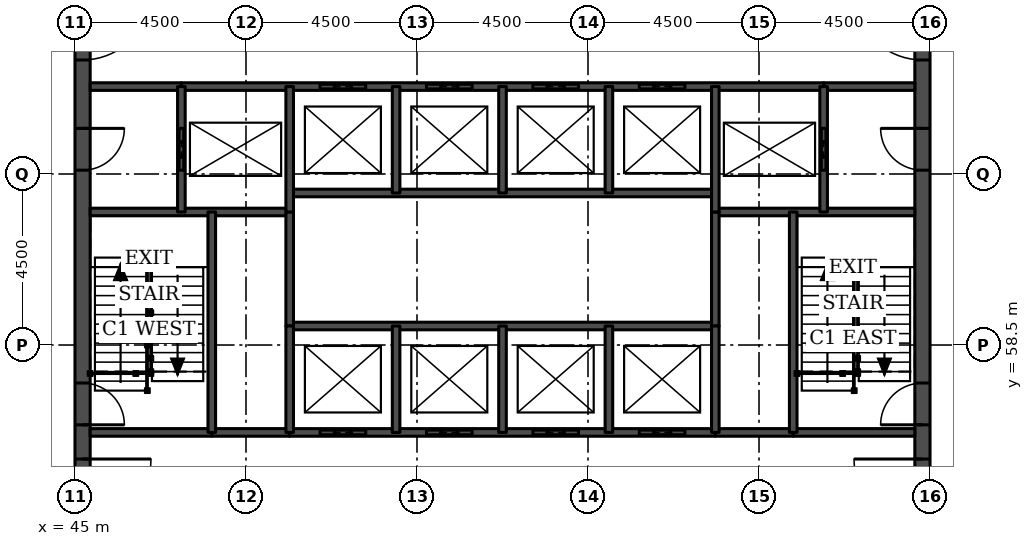
"""IFC4 building model, lengths in metres.
Left out: names, types, materials, properties, quantities, classifications, styles, units other than length and angle.
Written with IfcOpenShell. Run it as: python <this file> out.ifc"""

import sys

from ifc_helpers import new_model, si_unit, direction, frame, frame_2d, origin, place, context, subcontext, project, spatial, rectangle, extrude, element, fill, save


model = new_model("IFC4")
c1 = context("Model", 3, precision=1e-05, world=origin(), true_north=direction((0.0, 1.0)))
c2 = subcontext(c1, "Body", "Model", "MODEL_VIEW")
j1 = project(units=[si_unit("LENGTHUNIT", "METRE"), si_unit("PLANEANGLEUNIT", "RADIAN")], contexts=[c1])
p1 = place(None, origin())
s1 = spatial("IfcSite", under=j1, at=p1, CompositionType="ELEMENT")
p2 = place(p1, origin())
s2 = spatial("IfcBuilding", under=s1, at=p2, CompositionType="ELEMENT")
p3 = place(p2, frame((0.0, 0.0, 237.8)))
s3 = spatial("IfcBuildingStorey", under=s2, at=p3, CompositionType="ELEMENT", Elevation=237.8)
p4 = place(p3, frame((45.2, 49.5, 0.0), z_axis=(0.0, 0.0, 1.0), x_axis=(0.0, 1.0, 0.0)))
e1 = element("IfcWall", 1, at=p4, inside=s3, PredefinedType="SHEAR", context=c2, shape_type="SweptSolid", body=[
    extrude(rectangle(XDim=22.5, YDim=0.4, at=frame_2d((11.25, 0.0))), origin(), (0.0, 0.0, 1.0), 3.7),
])
p5 = place(p4, frame((4.2, 0.0, 0.0)))
e2 = element("IfcOpeningElement", 2, at=p5, cuts=e1, PredefinedType="OPENING", context=c2, shape_type="SweptSolid", body=[
    extrude(rectangle(XDim=1.8, YDim=2.1, at=frame_2d((0.9, 1.05))), frame((0.0, 0.21, 0.0), z_axis=(0.0, -1.0, 0.0), x_axis=(1.0, 0.0, 0.0)), (0.0, 0.0, 1.0), 0.42),
])
p6 = place(p4, frame((6.9, 0.0, 0.0)))
e3 = element("IfcOpeningElement", 3, at=p6, cuts=e1, PredefinedType="OPENING", context=c2, shape_type="SweptSolid", body=[
    extrude(rectangle(XDim=1.1, YDim=2.1, at=frame_2d((0.55, 1.05))), frame((0.0, 0.21, 0.0), z_axis=(0.0, -1.0, 0.0), x_axis=(1.0, 0.0, 0.0)), (0.0, 0.0, 1.0), 0.42),
])
p7 = place(p4, frame((13.6, 0.0, 0.0)))
e4 = element("IfcOpeningElement", 4, at=p7, cuts=e1, PredefinedType="OPENING", context=c2, shape_type="SweptSolid", body=[
    extrude(rectangle(XDim=1.1, YDim=2.1, at=frame_2d((0.55, 1.05))), frame((0.0, 0.21, 0.0), z_axis=(0.0, -1.0, 0.0), x_axis=(1.0, 0.0, 0.0)), (0.0, 0.0, 1.0), 0.42),
])
p8 = place(p4, frame((16.5, 0.0, 0.0)))
e5 = element("IfcOpeningElement", 5, at=p8, cuts=e1, PredefinedType="OPENING", context=c2, shape_type="SweptSolid", body=[
    extrude(rectangle(XDim=1.8, YDim=2.1, at=frame_2d((0.9, 1.05))), frame((0.0, 0.21, 0.0), z_axis=(0.0, -1.0, 0.0), x_axis=(1.0, 0.0, 0.0)), (0.0, 0.0, 1.0), 0.42),
])
p9 = place(p3, frame((67.3, 49.5, 0.0), z_axis=(0.0, 0.0, 1.0), x_axis=(0.0, 1.0, 0.0)))
e6 = element("IfcWall", 6, at=p9, inside=s3, PredefinedType="SHEAR", context=c2, shape_type="SweptSolid", body=[
    extrude(rectangle(XDim=22.5, YDim=0.4, at=frame_2d((11.25, 0.0))), origin(), (0.0, 0.0, 1.0), 3.7),
])
p10 = place(p9, frame((4.2, 0.0, 0.0)))
e7 = element("IfcOpeningElement", 7, at=p10, cuts=e6, PredefinedType="OPENING", context=c2, shape_type="SweptSolid", body=[
    extrude(rectangle(XDim=1.8, YDim=2.1, at=frame_2d((0.9, 1.05))), frame((0.0, 0.21, 0.0), z_axis=(0.0, -1.0, 0.0), x_axis=(1.0, 0.0, 0.0)), (0.0, 0.0, 1.0), 0.42),
])
p11 = place(p9, frame((6.9, 0.0, 0.0)))
e8 = element("IfcOpeningElement", 8, at=p11, cuts=e6, PredefinedType="OPENING", context=c2, shape_type="SweptSolid", body=[
    extrude(rectangle(XDim=1.1, YDim=2.1, at=frame_2d((0.55, 1.05))), frame((0.0, 0.21, 0.0), z_axis=(0.0, -1.0, 0.0), x_axis=(1.0, 0.0, 0.0)), (0.0, 0.0, 1.0), 0.42),
])
p12 = place(p9, frame((13.6, 0.0, 0.0)))
e9 = element("IfcOpeningElement", 9, at=p12, cuts=e6, PredefinedType="OPENING", context=c2, shape_type="SweptSolid", body=[
    extrude(rectangle(XDim=1.1, YDim=2.1, at=frame_2d((0.55, 1.05))), frame((0.0, 0.21, 0.0), z_axis=(0.0, -1.0, 0.0), x_axis=(1.0, 0.0, 0.0)), (0.0, 0.0, 1.0), 0.42),
])
p13 = place(p9, frame((16.5, 0.0, 0.0)))
e10 = element("IfcOpeningElement", 10, at=p13, cuts=e6, PredefinedType="OPENING", context=c2, shape_type="SweptSolid", body=[
    extrude(rectangle(XDim=1.8, YDim=2.1, at=frame_2d((0.9, 1.05))), frame((0.0, 0.21, 0.0), z_axis=(0.0, -1.0, 0.0), x_axis=(1.0, 0.0, 0.0)), (0.0, 0.0, 1.0), 0.42),
])
for number, where, z_axis, x_axis in (
    (11, (48.6, 56.2, 0.0), (0.0, 0.0, 1.0), (1.0, 0.0, 0.0)),
    (12, (61.85, 56.2, 0.0), (0.0, 0.0, 1.0), (1.0, 0.0, 0.0)),
):
    element("IfcWall", number, at=place(p3, frame(where, z_axis=z_axis, x_axis=x_axis)), inside=s3, PredefinedType="SOLIDWALL", context=c2, shape_type="SweptSolid", body=[
        extrude(rectangle(XDim=2.05, YDim=0.2, at=frame_2d((1.025, 0.0))), origin(), (0.0, 0.0, 1.0), 3.55),
    ])
p14 = place(p3, frame((45.4, 56.2, 0.0), z_axis=(0.0, 0.0, 1.0), x_axis=(1.0, 0.0, 0.0)))
e13 = element("IfcWall", 13, at=p14, inside=s3, PredefinedType="SOLIDWALL", context=c2, shape_type="SweptSolid", body=[
    extrude(rectangle(XDim=3.2, YDim=0.2, at=frame_2d((1.6, 0.0))), origin(), (0.0, 0.0, 1.0), 3.55),
])
p15 = place(p3, frame((50.65, 56.2, 0.0), z_axis=(0.0, 0.0, 1.0), x_axis=(1.0, 0.0, 0.0)))
e14 = element("IfcWall", 14, at=p15, inside=s3, PredefinedType="SOLIDWALL", context=c2, shape_type="SweptSolid", body=[
    extrude(rectangle(XDim=11.2, YDim=0.2, at=frame_2d((5.6, 0.0))), origin(), (0.0, 0.0, 1.0), 3.55),
])
p16 = place(p15, frame((0.8, 0.0, 0.0)))
e15 = element("IfcOpeningElement", 15, at=p16, cuts=e14, PredefinedType="OPENING", context=c2, shape_type="SweptSolid", body=[
    extrude(rectangle(XDim=1.2, YDim=2.1, at=frame_2d((0.6, 1.05))), frame((0.0, 0.11, 0.0), z_axis=(0.0, -1.0, 0.0), x_axis=(1.0, 0.0, 0.0)), (0.0, 0.0, 1.0), 0.22),
])
p17 = place(p15, frame((3.6, 0.0, 0.0)))
e16 = element("IfcOpeningElement", 16, at=p17, cuts=e14, PredefinedType="OPENING", context=c2, shape_type="SweptSolid", body=[
    extrude(rectangle(XDim=1.2, YDim=2.1, at=frame_2d((0.6, 1.05))), frame((0.0, 0.11, 0.0), z_axis=(0.0, -1.0, 0.0), x_axis=(1.0, 0.0, 0.0)), (0.0, 0.0, 1.0), 0.22),
])
p18 = place(p15, frame((6.4, 0.0, 0.0)))
e17 = element("IfcOpeningElement", 17, at=p18, cuts=e14, PredefinedType="OPENING", context=c2, shape_type="SweptSolid", body=[
    extrude(rectangle(XDim=1.2, YDim=2.1, at=frame_2d((0.6, 1.05))), frame((0.0, 0.11, 0.0), z_axis=(0.0, -1.0, 0.0), x_axis=(1.0, 0.0, 0.0)), (0.0, 0.0, 1.0), 0.22),
])
p19 = place(p15, frame((9.2, 0.0, 0.0)))
e18 = element("IfcOpeningElement", 18, at=p19, cuts=e14, PredefinedType="OPENING", context=c2, shape_type="SweptSolid", body=[
    extrude(rectangle(XDim=1.2, YDim=2.1, at=frame_2d((0.6, 1.05))), frame((0.0, 0.11, 0.0), z_axis=(0.0, -1.0, 0.0), x_axis=(1.0, 0.0, 0.0)), (0.0, 0.0, 1.0), 0.22),
])
p20 = place(p3, frame((63.9, 56.2, 0.0), z_axis=(0.0, 0.0, 1.0), x_axis=(1.0, 0.0, 0.0)))
e19 = element("IfcWall", 19, at=p20, inside=s3, PredefinedType="SOLIDWALL", context=c2, shape_type="SweptSolid", body=[
    extrude(rectangle(XDim=3.2, YDim=0.2, at=frame_2d((1.6, 0.0))), origin(), (0.0, 0.0, 1.0), 3.55),
])
p21 = place(p3, frame((50.65, 59.0, 0.0), z_axis=(0.0, 0.0, 1.0), x_axis=(1.0, 0.0, 0.0)))
e20 = element("IfcWall", 20, at=p21, inside=s3, PredefinedType="SOLIDWALL", context=c2, shape_type="SweptSolid", body=[
    extrude(rectangle(XDim=11.2, YDim=0.2, at=frame_2d((5.6, 0.0))), origin(), (0.0, 0.0, 1.0), 3.7),
])
for number, where, z_axis, x_axis in (
    (21, (45.4, 62.0, 0.0), (0.0, 0.0, 1.0), (1.0, 0.0, 0.0)),
    (22, (61.85, 62.0, 0.0), (0.0, 0.0, 1.0), (1.0, 0.0, 0.0)),
):
    element("IfcWall", number, at=place(p3, frame(where, z_axis=z_axis, x_axis=x_axis)), inside=s3, PredefinedType="SOLIDWALL", context=c2, shape_type="SweptSolid", body=[
        extrude(rectangle(XDim=5.25, YDim=0.2, at=frame_2d((2.625, 0.0))), origin(), (0.0, 0.0, 1.0), 3.55),
    ])
p22 = place(p3, frame((50.65, 62.5, 0.0), z_axis=(0.0, 0.0, 1.0), x_axis=(1.0, 0.0, 0.0)))
e23 = element("IfcWall", 23, at=p22, inside=s3, PredefinedType="SOLIDWALL", context=c2, shape_type="SweptSolid", body=[
    extrude(rectangle(XDim=11.2, YDim=0.2, at=frame_2d((5.6, 0.0))), origin(), (0.0, 0.0, 1.0), 3.7),
])
for number, where, z_axis, x_axis in (
    (24, (45.4, 65.3, 0.0), (0.0, 0.0, 1.0), (1.0, 0.0, 0.0)),
    (25, (64.7, 65.3, 0.0), (0.0, 0.0, 1.0), (1.0, 0.0, 0.0)),
):
    element("IfcWall", number, at=place(p3, frame(where, z_axis=z_axis, x_axis=x_axis)), inside=s3, PredefinedType="SOLIDWALL", context=c2, shape_type="SweptSolid", body=[
        extrude(rectangle(XDim=2.4, YDim=0.2, at=frame_2d((1.2, 0.0))), origin(), (0.0, 0.0, 1.0), 3.55),
    ])
p23 = place(p3, frame((47.8, 65.3, 0.0), z_axis=(0.0, 0.0, 1.0), x_axis=(1.0, 0.0, 0.0)))
e26 = element("IfcWall", 26, at=p23, inside=s3, PredefinedType="SOLIDWALL", context=c2, shape_type="SweptSolid", body=[
    extrude(rectangle(XDim=16.9, YDim=0.2, at=frame_2d((8.45, 0.0))), origin(), (0.0, 0.0, 1.0), 3.55),
])
p24 = place(p23, frame((3.65, 0.0, 0.0)))
e27 = element("IfcOpeningElement", 27, at=p24, cuts=e26, PredefinedType="OPENING", context=c2, shape_type="SweptSolid", body=[
    extrude(rectangle(XDim=1.2, YDim=2.1, at=frame_2d((0.6, 1.05))), frame((0.0, 0.11, 0.0), z_axis=(0.0, -1.0, 0.0), x_axis=(1.0, 0.0, 0.0)), (0.0, 0.0, 1.0), 0.22),
])
p25 = place(p23, frame((6.45, 0.0, 0.0)))
e28 = element("IfcOpeningElement", 28, at=p25, cuts=e26, PredefinedType="OPENING", context=c2, shape_type="SweptSolid", body=[
    extrude(rectangle(XDim=1.2, YDim=2.1, at=frame_2d((0.6, 1.05))), frame((0.0, 0.11, 0.0), z_axis=(0.0, -1.0, 0.0), x_axis=(1.0, 0.0, 0.0)), (0.0, 0.0, 1.0), 0.22),
])
p26 = place(p23, frame((9.25, 0.0, 0.0)))
e29 = element("IfcOpeningElement", 29, at=p26, cuts=e26, PredefinedType="OPENING", context=c2, shape_type="SweptSolid", body=[
    extrude(rectangle(XDim=1.2, YDim=2.1, at=frame_2d((0.6, 1.05))), frame((0.0, 0.11, 0.0), z_axis=(0.0, -1.0, 0.0), x_axis=(1.0, 0.0, 0.0)), (0.0, 0.0, 1.0), 0.22),
])
p27 = place(p23, frame((12.05, 0.0, 0.0)))
e30 = element("IfcOpeningElement", 30, at=p27, cuts=e26, PredefinedType="OPENING", context=c2, shape_type="SweptSolid", body=[
    extrude(rectangle(XDim=1.2, YDim=2.1, at=frame_2d((0.6, 1.05))), frame((0.0, 0.11, 0.0), z_axis=(0.0, -1.0, 0.0), x_axis=(1.0, 0.0, 0.0)), (0.0, 0.0, 1.0), 0.22),
])
p28 = place(p3, frame((47.8, 62.0, 0.0), z_axis=(0.0, 0.0, 1.0), x_axis=(0.0, 1.0, 0.0)))
e31 = element("IfcWall", 31, at=p28, inside=s3, PredefinedType="SOLIDWALL", context=c2, shape_type="SweptSolid", body=[
    extrude(rectangle(XDim=3.3, YDim=0.2, at=frame_2d((1.65, 0.0))), origin(), (0.0, 0.0, 1.0), 3.55),
])
p29 = place(p28, frame((1.1, 0.0, 0.0)))
e32 = element("IfcOpeningElement", 32, at=p29, cuts=e31, PredefinedType="OPENING", context=c2, shape_type="SweptSolid", body=[
    extrude(rectangle(XDim=1.1, YDim=2.1, at=frame_2d((0.55, 1.05))), frame((0.0, 0.11, 0.0), z_axis=(0.0, -1.0, 0.0), x_axis=(1.0, 0.0, 0.0)), (0.0, 0.0, 1.0), 0.22),
])
p30 = place(p3, frame((48.6, 56.2, 0.0), z_axis=(0.0, 0.0, 1.0), x_axis=(0.0, 1.0, 0.0)))
e33 = element("IfcWall", 33, at=p30, inside=s3, PredefinedType="SOLIDWALL", context=c2, shape_type="SweptSolid", body=[
    extrude(rectangle(XDim=5.8, YDim=0.2, at=frame_2d((2.9, 0.0))), origin(), (0.0, 0.0, 1.0), 3.55),
])
p31 = place(p3, frame((50.65, 59.0, 0.0), z_axis=(0.0, 0.0, 1.0), x_axis=(0.0, 1.0, 0.0)))
e34 = element("IfcWall", 34, at=p31, inside=s3, PredefinedType="SOLIDWALL", context=c2, shape_type="SweptSolid", body=[
    extrude(rectangle(XDim=3.0, YDim=0.2, at=frame_2d((1.5, 0.0))), origin(), (0.0, 0.0, 1.0), 3.7),
])
p32 = place(p3, frame((50.65, 56.2, 0.0), z_axis=(0.0, 0.0, 1.0), x_axis=(0.0, 1.0, 0.0)))
e35 = element("IfcWall", 35, at=p32, inside=s3, PredefinedType="SOLIDWALL", context=c2, shape_type="SweptSolid", body=[
    extrude(rectangle(XDim=2.8, YDim=0.2, at=frame_2d((1.4, 0.0))), origin(), (0.0, 0.0, 1.0), 3.55),
])
p33 = place(p3, frame((50.65, 62.0, 0.0), z_axis=(0.0, 0.0, 1.0), x_axis=(0.0, 1.0, 0.0)))
e36 = element("IfcWall", 36, at=p33, inside=s3, PredefinedType="SOLIDWALL", context=c2, shape_type="SweptSolid", body=[
    extrude(rectangle(XDim=3.3, YDim=0.2, at=frame_2d((1.65, 0.0))), origin(), (0.0, 0.0, 1.0), 3.55),
])
for number, where, z_axis, x_axis in (
    (37, (53.45, 56.2, 0.0), (0.0, 0.0, 1.0), (0.0, 1.0, 0.0)),
    (38, (53.45, 62.5, 0.0), (0.0, 0.0, 1.0), (0.0, 1.0, 0.0)),
    (39, (56.25, 56.2, 0.0), (0.0, 0.0, 1.0), (0.0, 1.0, 0.0)),
    (40, (56.25, 62.5, 0.0), (0.0, 0.0, 1.0), (0.0, 1.0, 0.0)),
    (41, (59.05, 56.2, 0.0), (0.0, 0.0, 1.0), (0.0, 1.0, 0.0)),
    (42, (59.05, 62.5, 0.0), (0.0, 0.0, 1.0), (0.0, 1.0, 0.0)),
):
    element("IfcWall", number, at=place(p3, frame(where, z_axis=z_axis, x_axis=x_axis)), inside=s3, PredefinedType="SOLIDWALL", context=c2, shape_type="SweptSolid", body=[
        extrude(rectangle(XDim=2.8, YDim=0.2, at=frame_2d((1.4, 0.0))), origin(), (0.0, 0.0, 1.0), 3.55),
    ])
p34 = place(p3, frame((61.85, 59.0, 0.0), z_axis=(0.0, 0.0, 1.0), x_axis=(0.0, 1.0, 0.0)))
e43 = element("IfcWall", 43, at=p34, inside=s3, PredefinedType="SOLIDWALL", context=c2, shape_type="SweptSolid", body=[
    extrude(rectangle(XDim=3.0, YDim=0.2, at=frame_2d((1.5, 0.0))), origin(), (0.0, 0.0, 1.0), 3.7),
])
p35 = place(p3, frame((61.85, 56.2, 0.0), z_axis=(0.0, 0.0, 1.0), x_axis=(0.0, 1.0, 0.0)))
e44 = element("IfcWall", 44, at=p35, inside=s3, PredefinedType="SOLIDWALL", context=c2, shape_type="SweptSolid", body=[
    extrude(rectangle(XDim=2.8, YDim=0.2, at=frame_2d((1.4, 0.0))), origin(), (0.0, 0.0, 1.0), 3.55),
])
p36 = place(p3, frame((61.85, 62.0, 0.0), z_axis=(0.0, 0.0, 1.0), x_axis=(0.0, 1.0, 0.0)))
e45 = element("IfcWall", 45, at=p36, inside=s3, PredefinedType="SOLIDWALL", context=c2, shape_type="SweptSolid", body=[
    extrude(rectangle(XDim=3.3, YDim=0.2, at=frame_2d((1.65, 0.0))), origin(), (0.0, 0.0, 1.0), 3.55),
])
p37 = place(p3, frame((63.9, 56.2, 0.0), z_axis=(0.0, 0.0, 1.0), x_axis=(0.0, 1.0, 0.0)))
e46 = element("IfcWall", 46, at=p37, inside=s3, PredefinedType="SOLIDWALL", context=c2, shape_type="SweptSolid", body=[
    extrude(rectangle(XDim=5.8, YDim=0.2, at=frame_2d((2.9, 0.0))), origin(), (0.0, 0.0, 1.0), 3.55),
])
p38 = place(p3, frame((64.7, 62.0, 0.0), z_axis=(0.0, 0.0, 1.0), x_axis=(0.0, 1.0, 0.0)))
e47 = element("IfcWall", 47, at=p38, inside=s3, PredefinedType="SOLIDWALL", context=c2, shape_type="SweptSolid", body=[
    extrude(rectangle(XDim=3.3, YDim=0.2, at=frame_2d((1.65, 0.0))), origin(), (0.0, 0.0, 1.0), 3.55),
])
p39 = place(p38, frame((1.1, 0.0, 0.0)))
e48 = element("IfcOpeningElement", 48, at=p39, cuts=e47, PredefinedType="OPENING", context=c2, shape_type="SweptSolid", body=[
    extrude(rectangle(XDim=1.1, YDim=2.1, at=frame_2d((0.55, 1.05))), frame((0.0, 0.11, 0.0), z_axis=(0.0, -1.0, 0.0), x_axis=(1.0, 0.0, 0.0)), (0.0, 0.0, 1.0), 0.22),
])
p40 = place(p16, origin())
e49 = element("IfcDoor", 49, at=p40, inside=s3, OperationType="DOUBLE_DOOR_SLIDING", PredefinedType="DOOR", context=c2, shape_type="SweptSolid", body=[
    extrude(rectangle(XDim=1.2, YDim=2.1, at=frame_2d((0.6, 1.05))), frame((0.0, 0.025, 0.0), z_axis=(0.0, -1.0, 0.0), x_axis=(1.0, 0.0, 0.0)), (0.0, 0.0, 1.0), 0.05),
])
fill(e15, e49)
p41 = place(p17, origin())
e50 = element("IfcDoor", 50, at=p41, inside=s3, OperationType="DOUBLE_DOOR_SLIDING", PredefinedType="DOOR", context=c2, shape_type="SweptSolid", body=[
    extrude(rectangle(XDim=1.2, YDim=2.1, at=frame_2d((0.6, 1.05))), frame((0.0, 0.025, 0.0), z_axis=(0.0, -1.0, 0.0), x_axis=(1.0, 0.0, 0.0)), (0.0, 0.0, 1.0), 0.05),
])
fill(e16, e50)
p42 = place(p18, origin())
e51 = element("IfcDoor", 51, at=p42, inside=s3, OperationType="DOUBLE_DOOR_SLIDING", PredefinedType="DOOR", context=c2, shape_type="SweptSolid", body=[
    extrude(rectangle(XDim=1.2, YDim=2.1, at=frame_2d((0.6, 1.05))), frame((0.0, 0.025, 0.0), z_axis=(0.0, -1.0, 0.0), x_axis=(1.0, 0.0, 0.0)), (0.0, 0.0, 1.0), 0.05),
])
fill(e17, e51)
p43 = place(p19, origin())
e52 = element("IfcDoor", 52, at=p43, inside=s3, OperationType="DOUBLE_DOOR_SLIDING", PredefinedType="DOOR", context=c2, shape_type="SweptSolid", body=[
    extrude(rectangle(XDim=1.2, YDim=2.1, at=frame_2d((0.6, 1.05))), frame((0.0, 0.025, 0.0), z_axis=(0.0, -1.0, 0.0), x_axis=(1.0, 0.0, 0.0)), (0.0, 0.0, 1.0), 0.05),
])
fill(e18, e52)
p44 = place(p24, origin())
e53 = element("IfcDoor", 53, at=p44, inside=s3, OperationType="DOUBLE_DOOR_SLIDING", PredefinedType="DOOR", context=c2, shape_type="SweptSolid", body=[
    extrude(rectangle(XDim=1.2, YDim=2.1, at=frame_2d((0.6, 1.05))), frame((0.0, 0.025, 0.0), z_axis=(0.0, -1.0, 0.0), x_axis=(1.0, 0.0, 0.0)), (0.0, 0.0, 1.0), 0.05),
])
fill(e27, e53)
p45 = place(p25, origin())
e54 = element("IfcDoor", 54, at=p45, inside=s3, OperationType="DOUBLE_DOOR_SLIDING", PredefinedType="DOOR", context=c2, shape_type="SweptSolid", body=[
    extrude(rectangle(XDim=1.2, YDim=2.1, at=frame_2d((0.6, 1.05))), frame((0.0, 0.025, 0.0), z_axis=(0.0, -1.0, 0.0), x_axis=(1.0, 0.0, 0.0)), (0.0, 0.0, 1.0), 0.05),
])
fill(e28, e54)
p46 = place(p26, origin())
e55 = element("IfcDoor", 55, at=p46, inside=s3, OperationType="DOUBLE_DOOR_SLIDING", PredefinedType="DOOR", context=c2, shape_type="SweptSolid", body=[
    extrude(rectangle(XDim=1.2, YDim=2.1, at=frame_2d((0.6, 1.05))), frame((0.0, 0.025, 0.0), z_axis=(0.0, -1.0, 0.0), x_axis=(1.0, 0.0, 0.0)), (0.0, 0.0, 1.0), 0.05),
])
fill(e29, e55)
p47 = place(p27, origin())
e56 = element("IfcDoor", 56, at=p47, inside=s3, OperationType="DOUBLE_DOOR_SLIDING", PredefinedType="DOOR", context=c2, shape_type="SweptSolid", body=[
    extrude(rectangle(XDim=1.2, YDim=2.1, at=frame_2d((0.6, 1.05))), frame((0.0, 0.025, 0.0), z_axis=(0.0, -1.0, 0.0), x_axis=(1.0, 0.0, 0.0)), (0.0, 0.0, 1.0), 0.05),
])
fill(e30, e56)
p48 = place(p29, origin())
e57 = element("IfcDoor", 57, at=p48, inside=s3, OperationType="DOUBLE_DOOR_SLIDING", PredefinedType="DOOR", context=c2, shape_type="SweptSolid", body=[
    extrude(rectangle(XDim=1.1, YDim=2.1, at=frame_2d((0.55, 1.05))), frame((0.0, 0.025, 0.0), z_axis=(0.0, -1.0, 0.0), x_axis=(1.0, 0.0, 0.0)), (0.0, 0.0, 1.0), 0.05),
])
fill(e32, e57)
p49 = place(p39, origin())
e58 = element("IfcDoor", 58, at=p49, inside=s3, OperationType="DOUBLE_DOOR_SLIDING", PredefinedType="DOOR", context=c2, shape_type="SweptSolid", body=[
    extrude(rectangle(XDim=1.1, YDim=2.1, at=frame_2d((0.55, 1.05))), frame((0.0, 0.025, 0.0), z_axis=(0.0, -1.0, 0.0), x_axis=(1.0, 0.0, 0.0)), (0.0, 0.0, 1.0), 0.05),
])
fill(e48, e58)
p50 = place(p5, frame((1.8, 0.0, 0.0), z_axis=(0.0, 0.0, 1.0), x_axis=(-1.0, 0.0, 0.0)))
e59 = element("IfcDoor", 59, at=p50, inside=s3, OperationType="SINGLE_SWING_LEFT", PredefinedType="DOOR", context=c2, shape_type="SweptSolid", body=[
    extrude(rectangle(XDim=1.8, YDim=2.1, at=frame_2d((0.9, 1.05))), frame((0.0, 0.025, 0.0), z_axis=(0.0, -1.0, 0.0), x_axis=(1.0, 0.0, 0.0)), (0.0, 0.0, 1.0), 0.05),
])
fill(e2, e59)
p51 = place(p6, frame((1.1, 0.0, 0.0), z_axis=(0.0, 0.0, 1.0), x_axis=(-1.0, 0.0, 0.0)))
e60 = element("IfcDoor", 60, at=p51, inside=s3, OperationType="SINGLE_SWING_RIGHT", PredefinedType="DOOR", context=c2, shape_type="SweptSolid", body=[
    extrude(rectangle(XDim=1.1, YDim=2.1, at=frame_2d((0.55, 1.05))), frame((0.0, 0.025, 0.0), z_axis=(0.0, -1.0, 0.0), x_axis=(1.0, 0.0, 0.0)), (0.0, 0.0, 1.0), 0.05),
])
fill(e3, e60)
p52 = place(p7, frame((1.1, 0.0, 0.0), z_axis=(0.0, 0.0, 1.0), x_axis=(-1.0, 0.0, 0.0)))
e61 = element("IfcDoor", 61, at=p52, inside=s3, OperationType="SINGLE_SWING_LEFT", PredefinedType="DOOR", context=c2, shape_type="SweptSolid", body=[
    extrude(rectangle(XDim=1.1, YDim=2.1, at=frame_2d((0.55, 1.05))), frame((0.0, 0.025, 0.0), z_axis=(0.0, -1.0, 0.0), x_axis=(1.0, 0.0, 0.0)), (0.0, 0.0, 1.0), 0.05),
])
fill(e4, e61)
p53 = place(p8, frame((1.8, 0.0, 0.0), z_axis=(0.0, 0.0, 1.0), x_axis=(-1.0, 0.0, 0.0)))
e62 = element("IfcDoor", 62, at=p53, inside=s3, OperationType="SINGLE_SWING_LEFT", PredefinedType="DOOR", context=c2, shape_type="SweptSolid", body=[
    extrude(rectangle(XDim=1.8, YDim=2.1, at=frame_2d((0.9, 1.05))), frame((0.0, 0.025, 0.0), z_axis=(0.0, -1.0, 0.0), x_axis=(1.0, 0.0, 0.0)), (0.0, 0.0, 1.0), 0.05),
])
fill(e5, e62)
p54 = place(p10, origin())
e63 = element("IfcDoor", 63, at=p54, inside=s3, OperationType="SINGLE_SWING_RIGHT", PredefinedType="DOOR", context=c2, shape_type="SweptSolid", body=[
    extrude(rectangle(XDim=1.8, YDim=2.1, at=frame_2d((0.9, 1.05))), frame((0.0, 0.025, 0.0), z_axis=(0.0, -1.0, 0.0), x_axis=(1.0, 0.0, 0.0)), (0.0, 0.0, 1.0), 0.05),
])
fill(e7, e63)
p55 = place(p11, origin())
e64 = element("IfcDoor", 64, at=p55, inside=s3, OperationType="SINGLE_SWING_LEFT", PredefinedType="DOOR", context=c2, shape_type="SweptSolid", body=[
    extrude(rectangle(XDim=1.1, YDim=2.1, at=frame_2d((0.55, 1.05))), frame((0.0, 0.025, 0.0), z_axis=(0.0, -1.0, 0.0), x_axis=(1.0, 0.0, 0.0)), (0.0, 0.0, 1.0), 0.05),
])
fill(e8, e64)
p56 = place(p12, origin())
e65 = element("IfcDoor", 65, at=p56, inside=s3, OperationType="SINGLE_SWING_RIGHT", PredefinedType="DOOR", context=c2, shape_type="SweptSolid", body=[
    extrude(rectangle(XDim=1.1, YDim=2.1, at=frame_2d((0.55, 1.05))), frame((0.0, 0.025, 0.0), z_axis=(0.0, -1.0, 0.0), x_axis=(1.0, 0.0, 0.0)), (0.0, 0.0, 1.0), 0.05),
])
fill(e9, e65)
p57 = place(p13, origin())
e66 = element("IfcDoor", 66, at=p57, inside=s3, OperationType="SINGLE_SWING_RIGHT", PredefinedType="DOOR", context=c2, shape_type="SweptSolid", body=[
    extrude(rectangle(XDim=1.8, YDim=2.1, at=frame_2d((0.9, 1.05))), frame((0.0, 0.025, 0.0), z_axis=(0.0, -1.0, 0.0), x_axis=(1.0, 0.0, 0.0)), (0.0, 0.0, 1.0), 0.05),
])
fill(e10, e66)
save(model, sys.argv[1])
